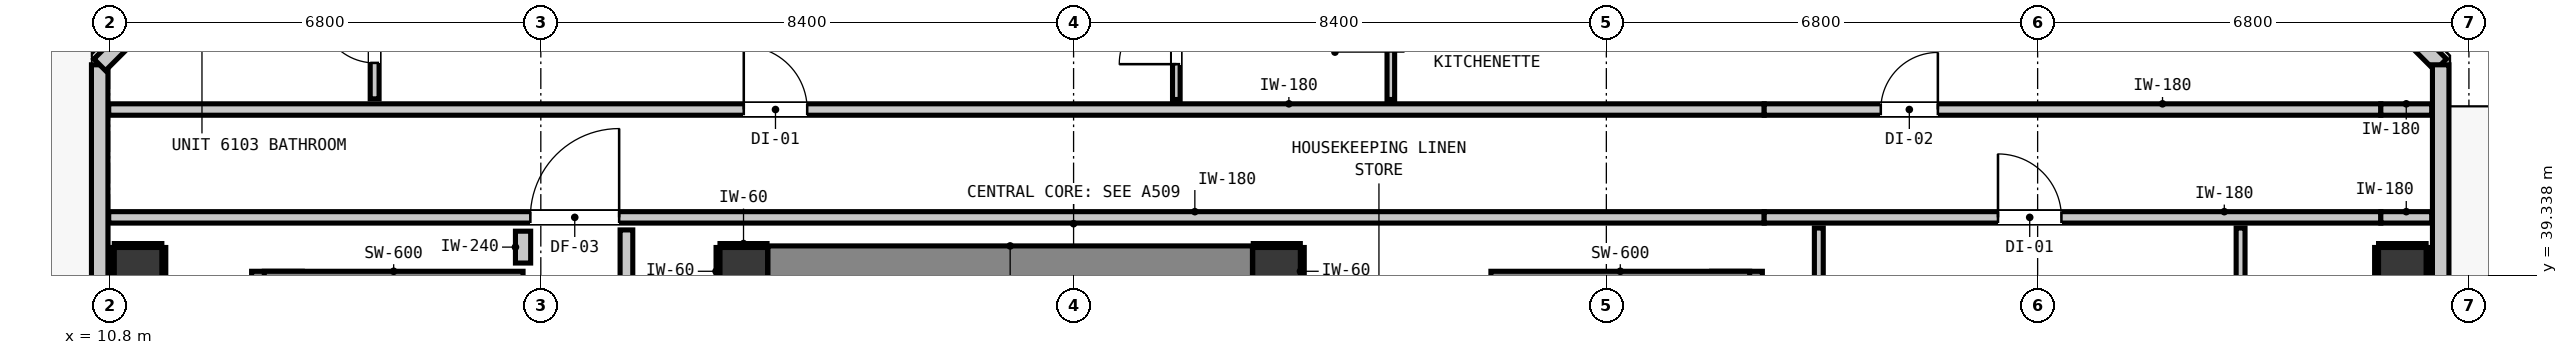
"""IFC4 building model, lengths in metres.
Left out: names, types, materials, properties, quantities, classifications, styles, units other than length and angle.
Written with IfcOpenShell. Run it as: python <this file> out.ifc"""

import sys

from ifc_helpers import new_model, si_unit, direction, frame, frame_2d, origin, origin_2d, place, context, subcontext, project, spatial, rectangle, extrude, element, fill, save


model = new_model("IFC4")
c1 = context("Model", 3, precision=1e-05, world=origin(), true_north=direction((0.0, 1.0)))
c2 = subcontext(c1, "Body", "Model", "MODEL_VIEW")
j1 = project(units=[si_unit("LENGTHUNIT", "METRE"), si_unit("PLANEANGLEUNIT", "RADIAN")], contexts=[c1])
p1 = place(None, origin())
s1 = spatial("IfcSite", under=j1, at=p1, CompositionType="ELEMENT")
p2 = place(p1, origin())
s2 = spatial("IfcBuilding", under=s1, at=p2, CompositionType="ELEMENT")
p3 = place(p2, frame((0.0, 0.0, 210.08)))
s3 = spatial("IfcBuildingStorey", under=s2, at=p3, CompositionType="ELEMENT", Elevation=210.08)
for number, where, z_axis, x_axis in (
    (1, (20.8, 39.4, 0.0), (0.0, 0.0, 1.0), (1.0, 0.0, 0.0)),
    (2, (29.2, 39.4, 0.0), (0.0, 0.0, 1.0), (1.0, 0.0, 0.0)),
):
    element("IfcColumn", number, at=place(p3, frame(where, z_axis=z_axis, x_axis=x_axis)), inside=s3, PredefinedType="COLUMN", context=c2, shape_type="SweptSolid", body=[
        extrude(rectangle(XDim=0.75, YDim=0.75, at=origin_2d()), origin(), (0.0, 0.0, 1.0), 3.32),
    ])
p4 = place(p3, frame((13.44, 31.08, 0.0), z_axis=(0.0, 0.0, 1.0), x_axis=(0.0, 1.0, 0.0)))
e3 = element("IfcWall", 3, at=p4, inside=s3, PredefinedType="SHEAR", context=c2, shape_type="SweptSolid", body=[
    extrude(rectangle(XDim=8.32, YDim=0.8, at=frame_2d((4.16, 0.0))), origin(), (0.0, 0.0, 1.0), 3.32),
])
p5 = place(p3, frame((13.24, 39.1, 0.0), z_axis=(0.0, 0.0, 1.0), x_axis=(1.0, 0.0, 0.0)))
e4 = element("IfcWall", 4, at=p5, inside=s3, PredefinedType="SHEAR", context=c2, shape_type="SweptSolid", body=[
    extrude(rectangle(XDim=4.08, YDim=0.6, at=frame_2d((2.04, 0.0))), origin(), (0.0, 0.0, 1.0), 3.32),
])
p6 = place(p3, frame((36.46, 31.08, 0.0), z_axis=(0.0, 0.0, 1.0), x_axis=(0.0, 1.0, 0.0)))
e5 = element("IfcWall", 5, at=p6, inside=s3, PredefinedType="SHEAR", context=c2, shape_type="SweptSolid", body=[
    extrude(rectangle(XDim=8.32, YDim=0.8, at=frame_2d((4.16, 0.0))), origin(), (0.0, 0.0, 1.0), 3.32),
])
p7 = place(p3, frame((32.58, 39.1, 0.0), z_axis=(0.0, 0.0, 1.0), x_axis=(1.0, 0.0, 0.0)))
e6 = element("IfcWall", 6, at=p7, inside=s3, PredefinedType="SHEAR", context=c2, shape_type="SweptSolid", body=[
    extrude(rectangle(XDim=4.08, YDim=0.6, at=frame_2d((2.04, 0.0))), origin(), (0.0, 0.0, 1.0), 3.32),
])
p8 = place(p3, frame((21.18, 39.4, 0.0), z_axis=(0.0, 0.0, 1.0), x_axis=(1.0, 0.0, 0.0)))
e7 = element("IfcWall", 7, at=p8, inside=s3, PredefinedType="SHEAR", context=c2, shape_type="SweptSolid", body=[
    extrude(rectangle(XDim=7.64, YDim=0.8, at=frame_2d((3.82, 0.0))), origin(), (0.0, 0.0, 1.0), 3.32),
])
for number, where, z_axis, x_axis in (
    (8, (11.25, 39.4, -0.2), (0.0, 0.0, 1.0), (1.0, 0.0, 0.0)),
    (9, (46.95, 39.4, -0.2), (0.0, 0.0, 1.0), (1.0, 0.0, 0.0)),
):
    element("IfcColumn", number, at=place(p3, frame(where, z_axis=z_axis, x_axis=x_axis)), inside=s3, PredefinedType="COLUMN", context=c2, shape_type="SweptSolid", body=[
        extrude(rectangle(XDim=0.75, YDim=0.75, at=origin_2d()), origin(), (0.0, 0.0, 1.0), 3.52),
    ])
p9 = place(p3, frame((10.645, 12.345, 0.0), z_axis=(0.0, 0.0, 1.0), x_axis=(0.0, 1.0, 0.0)))
e10 = element("IfcWall", 10, at=p9, inside=s3, PredefinedType="STANDARD", context=c2, shape_type="SweptSolid", body=[
    extrude(rectangle(XDim=30.31, YDim=0.26, at=frame_2d((15.155, 0.0))), origin(), (0.0, 0.0, 1.0), 3.1),
])
p10 = place(p9, frame((0.507, 0.0, 0.0)))
e11 = element("IfcOpeningElement", 11, at=p10, cuts=e10, PredefinedType="OPENING", context=c2, shape_type="SweptSolid", body=[
    extrude(rectangle(XDim=1.1, YDim=2.15, at=frame_2d((0.55, 1.075))), frame((0.0, 0.14, 0.0), z_axis=(0.0, -1.0, 0.0), x_axis=(1.0, 0.0, 0.0)), (0.0, 0.0, 1.0), 0.28),
])
p11 = place(p9, frame((2.011, 0.0, 0.85)))
e12 = element("IfcOpeningElement", 12, at=p11, cuts=e10, PredefinedType="OPENING", context=c2, shape_type="SweptSolid", body=[
    extrude(rectangle(XDim=0.9, YDim=1.5, at=frame_2d((0.45, 0.75))), frame((0.0, 0.14, 0.0), z_axis=(0.0, -1.0, 0.0), x_axis=(1.0, 0.0, 0.0)), (0.0, 0.0, 1.0), 0.28),
])
for number, where, z_axis, x_axis in (
    (13, (10.645, 42.655, 0.0), (0.0, 0.0, 1.0), (0.707, 0.707, 0.0)),
    (14, (45.455, 44.755, 0.0), (0.0, 0.0, 1.0), (0.707, -0.707, 0.0)),
):
    element("IfcWall", number, at=place(p3, frame(where, z_axis=z_axis, x_axis=x_axis)), inside=s3, PredefinedType="STANDARD", context=c2, shape_type="SweptSolid", body=[
        extrude(rectangle(XDim=2.97, YDim=0.26, at=frame_2d((1.485, 0.0))), origin(), (0.0, 0.0, 1.0), 3.1),
    ])
p12 = place(p3, frame((47.555, 42.655, 0.0), z_axis=(0.0, 0.0, 1.0), x_axis=(0.0, -1.0, 0.0)))
e15 = element("IfcWall", 15, at=p12, inside=s3, PredefinedType="STANDARD", context=c2, shape_type="SweptSolid", body=[
    extrude(rectangle(XDim=30.31, YDim=0.26, at=frame_2d((15.155, 0.0))), origin(), (0.0, 0.0, 1.0), 3.1),
])
p13 = place(p12, frame((4.082, 0.0, 0.0)))
e16 = element("IfcOpeningElement", 16, at=p13, cuts=e15, PredefinedType="OPENING", context=c2, shape_type="SweptSolid", body=[
    extrude(rectangle(XDim=1.0, YDim=2.15, at=frame_2d((0.5, 1.075))), frame((0.0, 0.14, 0.0), z_axis=(0.0, -1.0, 0.0), x_axis=(1.0, 0.0, 0.0)), (0.0, 0.0, 1.0), 0.28),
])
p14 = place(p12, frame((24.251, 0.0, 0.85)))
e17 = element("IfcOpeningElement", 17, at=p14, cuts=e15, PredefinedType="OPENING", context=c2, shape_type="SweptSolid", body=[
    extrude(rectangle(XDim=1.8, YDim=1.9, at=frame_2d((0.9, 0.95))), frame((0.0, 0.14, 0.0), z_axis=(0.0, -1.0, 0.0), x_axis=(1.0, 0.0, 0.0)), (0.0, 0.0, 1.0), 0.28),
])
p15 = place(p12, frame((27.808, 0.0, 0.85)))
e18 = element("IfcOpeningElement", 18, at=p15, cuts=e15, PredefinedType="OPENING", context=c2, shape_type="SweptSolid", body=[
    extrude(rectangle(XDim=1.8, YDim=1.9, at=frame_2d((0.9, 0.95))), frame((0.0, 0.14, 0.0), z_axis=(0.0, -1.0, 0.0), x_axis=(1.0, 0.0, 0.0)), (0.0, 0.0, 1.0), 0.28),
])
p16 = place(p3, frame((10.787, 40.25, 0.0), z_axis=(0.0, 0.0, 1.0), x_axis=(1.0, 0.0, 0.0)))
e19 = element("IfcWall", 19, at=p16, inside=s3, PredefinedType="PARTITIONING", context=c2, shape_type="SweptSolid", body=[
    extrude(rectangle(XDim=26.102, YDim=0.18, at=frame_2d((13.051, 0.0))), origin(), (0.0, 0.0, 1.0), 3.1),
])
p17 = place(p16, frame((6.648, 0.0, 0.0)))
e20 = element("IfcOpeningElement", 20, at=p17, cuts=e19, PredefinedType="OPENING", context=c2, shape_type="SweptSolid", body=[
    extrude(rectangle(XDim=1.4, YDim=2.15, at=frame_2d((0.7, 1.075))), frame((0.0, 0.1, 0.0), z_axis=(0.0, -1.0, 0.0), x_axis=(1.0, 0.0, 0.0)), (0.0, 0.0, 1.0), 0.2),
])
p18 = place(p3, frame((36.889, 40.25, 0.0), z_axis=(0.0, 0.0, 1.0), x_axis=(1.0, 0.0, 0.0)))
e21 = element("IfcWall", 21, at=p18, inside=s3, PredefinedType="PARTITIONING", context=c2, shape_type="SweptSolid", body=[
    extrude(rectangle(XDim=9.722, YDim=0.18, at=frame_2d((4.861, 0.0))), origin(), (0.0, 0.0, 1.0), 2.477),
])
p19 = place(p18, frame((3.686, 0.0, 0.0)))
e22 = element("IfcOpeningElement", 22, at=p19, cuts=e21, PredefinedType="OPENING", context=c2, shape_type="SweptSolid", body=[
    extrude(rectangle(XDim=1.0, YDim=2.15, at=frame_2d((0.5, 1.075))), frame((0.0, 0.1, 0.0), z_axis=(0.0, -1.0, 0.0), x_axis=(1.0, 0.0, 0.0)), (0.0, 0.0, 1.0), 0.2),
])
p20 = place(p3, frame((46.611, 40.25, 0.0), z_axis=(0.0, 0.0, 1.0), x_axis=(1.0, 0.0, 0.0)))
e23 = element("IfcWall", 23, at=p20, inside=s3, PredefinedType="PARTITIONING", context=c2, shape_type="SweptSolid", body=[
    extrude(rectangle(XDim=0.802, YDim=0.18, at=frame_2d((0.401, 0.0))), origin(), (0.0, 0.0, 1.0), 3.1),
])
p21 = place(p3, frame((10.787, 41.95, 0.0), z_axis=(0.0, 0.0, 1.0), x_axis=(1.0, 0.0, 0.0)))
e24 = element("IfcWall", 24, at=p21, inside=s3, PredefinedType="PARTITIONING", context=c2, shape_type="SweptSolid", body=[
    extrude(rectangle(XDim=26.102, YDim=0.18, at=frame_2d((13.051, 0.0))), origin(), (0.0, 0.0, 1.0), 3.1),
])
p22 = place(p21, frame((10.013, 0.0, 0.0)))
e25 = element("IfcOpeningElement", 25, at=p22, cuts=e24, PredefinedType="OPENING", context=c2, shape_type="SweptSolid", body=[
    extrude(rectangle(XDim=1.0, YDim=2.15, at=frame_2d((0.5, 1.075))), frame((0.0, 0.1, 0.0), z_axis=(0.0, -1.0, 0.0), x_axis=(1.0, 0.0, 0.0)), (0.0, 0.0, 1.0), 0.2),
])
p23 = place(p3, frame((36.889, 41.95, 0.0), z_axis=(0.0, 0.0, 1.0), x_axis=(1.0, 0.0, 0.0)))
e26 = element("IfcWall", 26, at=p23, inside=s3, PredefinedType="PARTITIONING", context=c2, shape_type="SweptSolid", body=[
    extrude(rectangle(XDim=9.722, YDim=0.18, at=frame_2d((4.861, 0.0))), origin(), (0.0, 0.0, 1.0), 2.477),
])
p24 = place(p23, frame((1.838, 0.0, 0.0)))
e27 = element("IfcOpeningElement", 27, at=p24, cuts=e26, PredefinedType="OPENING", context=c2, shape_type="SweptSolid", body=[
    extrude(rectangle(XDim=0.9, YDim=2.1, at=frame_2d((0.45, 1.05))), frame((0.0, 0.1, 0.0), z_axis=(0.0, -1.0, 0.0), x_axis=(1.0, 0.0, 0.0)), (0.0, 0.0, 1.0), 0.2),
])
p25 = place(p3, frame((46.611, 41.95, 0.0), z_axis=(0.0, 0.0, 1.0), x_axis=(1.0, 0.0, 0.0)))
e28 = element("IfcWall", 28, at=p25, inside=s3, PredefinedType="PARTITIONING", context=c2, shape_type="SweptSolid", body=[
    extrude(rectangle(XDim=0.802, YDim=0.18, at=frame_2d((0.401, 0.0))), origin(), (0.0, 0.0, 1.0), 3.1),
])
p26 = place(p3, frame((17.32, 39.53, 0.0), z_axis=(0.0, 0.0, 1.0), x_axis=(0.0, 1.0, 0.0)))
e29 = element("IfcWall", 29, at=p26, inside=s3, PredefinedType="PARTITIONING", context=c2, shape_type="SweptSolid", body=[
    extrude(rectangle(XDim=0.502, YDim=0.24, at=frame_2d((0.251, 0.0))), origin(), (0.0, 0.0, 1.0), 3.1),
])
p27 = place(p3, frame((18.95, 38.918, 0.0), z_axis=(0.0, 0.0, 1.0), x_axis=(0.0, 1.0, 0.0)))
e30 = element("IfcWall", 30, at=p27, inside=s3, PredefinedType="PARTITIONING", context=c2, shape_type="SweptSolid", body=[
    extrude(rectangle(XDim=1.134, YDim=0.2, at=frame_2d((0.567, 0.0))), origin(), (0.0, 0.0, 1.0), 3.1),
])
p28 = place(p3, frame((14.98, 42.118, 0.0), z_axis=(0.0, 0.0, 1.0), x_axis=(0.0, 1.0, 0.0)))
e31 = element("IfcWall", 31, at=p28, inside=s3, PredefinedType="PARTITIONING", context=c2, shape_type="SweptSolid", body=[
    extrude(rectangle(XDim=2.495, YDim=0.14, at=frame_2d((1.248, 0.0))), origin(), (0.0, 0.0, 1.0), 3.1),
])
p29 = place(p28, frame((0.567, 0.0, 0.0)))
e32 = element("IfcOpeningElement", 32, at=p29, cuts=e31, PredefinedType="OPENING", context=c2, shape_type="SweptSolid", body=[
    extrude(rectangle(XDim=0.86, YDim=2.02, at=frame_2d((0.43, 1.01))), frame((0.0, 0.08, 0.0), z_axis=(0.0, -1.0, 0.0), x_axis=(1.0, 0.0, 0.0)), (0.0, 0.0, 1.0), 0.16),
])
p30 = place(p3, frame((37.75, 30.048, 0.0), z_axis=(0.0, 0.0, 1.0), x_axis=(0.0, 1.0, 0.0)))
e33 = element("IfcWall", 33, at=p30, inside=s3, PredefinedType="PARTITIONING", context=c2, shape_type="SweptSolid", body=[
    extrude(rectangle(XDim=10.034, YDim=0.14, at=frame_2d((5.017, 0.0))), origin(), (0.0, 0.0, 1.0), 3.1),
])
p31 = place(p3, frame((44.4, 35.248, 0.0), z_axis=(0.0, 0.0, 1.0), x_axis=(0.0, 1.0, 0.0)))
e34 = element("IfcWall", 34, at=p31, inside=s3, PredefinedType="PARTITIONING", context=c2, shape_type="SweptSolid", body=[
    extrude(rectangle(XDim=4.834, YDim=0.14, at=frame_2d((2.417, 0.0))), origin(), (0.0, 0.0, 1.0), 3.1),
])
p32 = place(p31, frame((1.964, 0.0, 0.0)))
e35 = element("IfcOpeningElement", 35, at=p32, cuts=e34, PredefinedType="OPENING", context=c2, shape_type="SweptSolid", body=[
    extrude(rectangle(XDim=0.9, YDim=2.1, at=frame_2d((0.45, 1.05))), frame((0.0, 0.08, 0.0), z_axis=(0.0, -1.0, 0.0), x_axis=(1.0, 0.0, 0.0)), (0.0, 0.0, 1.0), 0.16),
])
p33 = place(p3, frame((27.62, 42.108, 0.0), z_axis=(0.0, 0.0, 1.0), x_axis=(0.0, 1.0, 0.0)))
e36 = element("IfcWall", 36, at=p33, inside=s3, PredefinedType="PARTITIONING", context=c2, shape_type="SweptSolid", body=[
    extrude(rectangle(XDim=2.505, YDim=0.12, at=frame_2d((1.252, 0.0))), origin(), (0.0, 0.0, 1.0), 3.1),
])
p34 = place(p33, frame((0.557, 0.0, 0.0)))
e37 = element("IfcOpeningElement", 37, at=p34, cuts=e36, PredefinedType="OPENING", context=c2, shape_type="SweptSolid", body=[
    extrude(rectangle(XDim=0.9, YDim=2.1, at=frame_2d((0.45, 1.05))), frame((0.0, 0.07, 0.0), z_axis=(0.0, -1.0, 0.0), x_axis=(1.0, 0.0, 0.0)), (0.0, 0.0, 1.0), 0.14),
])
p35 = place(p3, frame((31.002, 42.108, 0.0), z_axis=(0.0, 0.0, 1.0), x_axis=(0.0, 1.0, 0.0)))
e38 = element("IfcWall", 38, at=p35, inside=s3, PredefinedType="PARTITIONING", context=c2, shape_type="SweptSolid", body=[
    extrude(rectangle(XDim=2.505, YDim=0.12, at=frame_2d((1.252, 0.0))), origin(), (0.0, 0.0, 1.0), 3.1),
])
p36 = place(p3, frame((20.425, 39.807, 0.0), z_axis=(0.0, 0.0, 1.0), x_axis=(1.0, 0.0, 0.0)))
e39 = element("IfcWall", 39, at=p36, inside=s3, PredefinedType="PARTITIONING", context=c2, shape_type="SweptSolid", body=[
    extrude(rectangle(XDim=0.742, YDim=0.06, at=frame_2d((0.371, 0.0))), origin(), (0.0, 0.0, 1.0), 1.45),
])
p37 = place(p3, frame((20.393, 39.025, 0.0), z_axis=(0.0, 0.0, 1.0), x_axis=(0.0, 1.0, 0.0)))
e40 = element("IfcWall", 40, at=p37, inside=s3, PredefinedType="PARTITIONING", context=c2, shape_type="SweptSolid", body=[
    extrude(rectangle(XDim=0.75, YDim=0.06, at=frame_2d((0.375, 0.0))), origin(), (0.0, 0.0, 1.0), 1.45),
])
p38 = place(p3, frame((28.833, 39.807, 0.0), z_axis=(0.0, 0.0, 1.0), x_axis=(1.0, 0.0, 0.0)))
e41 = element("IfcWall", 41, at=p38, inside=s3, PredefinedType="PARTITIONING", context=c2, shape_type="SweptSolid", body=[
    extrude(rectangle(XDim=0.742, YDim=0.06, at=frame_2d((0.371, 0.0))), origin(), (0.0, 0.0, 1.0), 1.45),
])
for number, where, z_axis, x_axis in (
    (42, (29.607, 39.025, 0.0), (0.0, 0.0, 1.0), (0.0, 1.0, 0.0)),
    (43, (10.875, 39.807, 0.0), (0.0, 0.0, 1.0), (1.0, 0.0, 0.0)),
    (44, (10.843, 39.025, 0.0), (0.0, 0.0, 1.0), (0.0, 1.0, 0.0)),
    (45, (11.657, 39.025, 0.0), (0.0, 0.0, 1.0), (0.0, 1.0, 0.0)),
    (46, (46.575, 39.807, 0.0), (0.0, 0.0, 1.0), (1.0, 0.0, 0.0)),
    (47, (46.543, 39.025, 0.0), (0.0, 0.0, 1.0), (0.0, 1.0, 0.0)),
    (48, (47.357, 39.025, 0.0), (0.0, 0.0, 1.0), (0.0, 1.0, 0.0)),
):
    element("IfcWall", number, at=place(p3, frame(where, z_axis=z_axis, x_axis=x_axis)), inside=s3, PredefinedType="PARTITIONING", context=c2, shape_type="SweptSolid", body=[
        extrude(rectangle(XDim=0.75, YDim=0.06, at=frame_2d((0.375, 0.0))), origin(), (0.0, 0.0, 1.0), 1.45),
    ])
p39 = place(p17, origin())
e49 = element("IfcDoor", 49, at=p39, inside=s3, OperationType="SINGLE_SWING_RIGHT", PredefinedType="DOOR", context=c2, shape_type="SweptSolid", body=[
    extrude(rectangle(XDim=1.4, YDim=2.15, at=frame_2d((0.7, 1.075))), frame((0.0, 0.025, 0.0), z_axis=(0.0, -1.0, 0.0), x_axis=(1.0, 0.0, 0.0)), (0.0, 0.0, 1.0), 0.05),
])
fill(e20, e49)
p40 = place(p22, origin())
e50 = element("IfcDoor", 50, at=p40, inside=s3, OperationType="SINGLE_SWING_LEFT", PredefinedType="DOOR", context=c2, shape_type="SweptSolid", body=[
    extrude(rectangle(XDim=1.0, YDim=2.15, at=frame_2d((0.5, 1.075))), frame((0.0, 0.025, 0.0), z_axis=(0.0, -1.0, 0.0), x_axis=(1.0, 0.0, 0.0)), (0.0, 0.0, 1.0), 0.05),
])
fill(e25, e50)
p41 = place(p29, origin())
e51 = element("IfcDoor", 51, at=p41, inside=s3, OperationType="SINGLE_SWING_RIGHT", PredefinedType="DOOR", context=c2, shape_type="SweptSolid", body=[
    extrude(rectangle(XDim=0.86, YDim=2.02, at=frame_2d((0.43, 1.01))), frame((0.0, 0.025, 0.0), z_axis=(0.0, -1.0, 0.0), x_axis=(1.0, 0.0, 0.0)), (0.0, 0.0, 1.0), 0.05),
])
fill(e32, e51)
p42 = place(p34, origin())
e52 = element("IfcDoor", 52, at=p42, inside=s3, OperationType="SINGLE_SWING_LEFT", PredefinedType="DOOR", context=c2, shape_type="SweptSolid", body=[
    extrude(rectangle(XDim=0.9, YDim=2.1, at=frame_2d((0.45, 1.05))), frame((0.0, 0.025, 0.0), z_axis=(0.0, -1.0, 0.0), x_axis=(1.0, 0.0, 0.0)), (0.0, 0.0, 1.0), 0.05),
])
fill(e37, e52)
p43 = place(p24, origin())
e53 = element("IfcDoor", 53, at=p43, inside=s3, OperationType="SINGLE_SWING_RIGHT", PredefinedType="DOOR", context=c2, shape_type="SweptSolid", body=[
    extrude(rectangle(XDim=0.9, YDim=2.1, at=frame_2d((0.45, 1.05))), frame((0.0, 0.025, 0.0), z_axis=(0.0, -1.0, 0.0), x_axis=(1.0, 0.0, 0.0)), (0.0, 0.0, 1.0), 0.05),
])
fill(e27, e53)
p44 = place(p19, origin())
e54 = element("IfcDoor", 54, at=p44, inside=s3, OperationType="SINGLE_SWING_LEFT", PredefinedType="DOOR", context=c2, shape_type="SweptSolid", body=[
    extrude(rectangle(XDim=1.0, YDim=2.15, at=frame_2d((0.5, 1.075))), frame((0.0, 0.025, 0.0), z_axis=(0.0, -1.0, 0.0), x_axis=(1.0, 0.0, 0.0)), (0.0, 0.0, 1.0), 0.05),
])
fill(e22, e54)
save(model, sys.argv[1])
